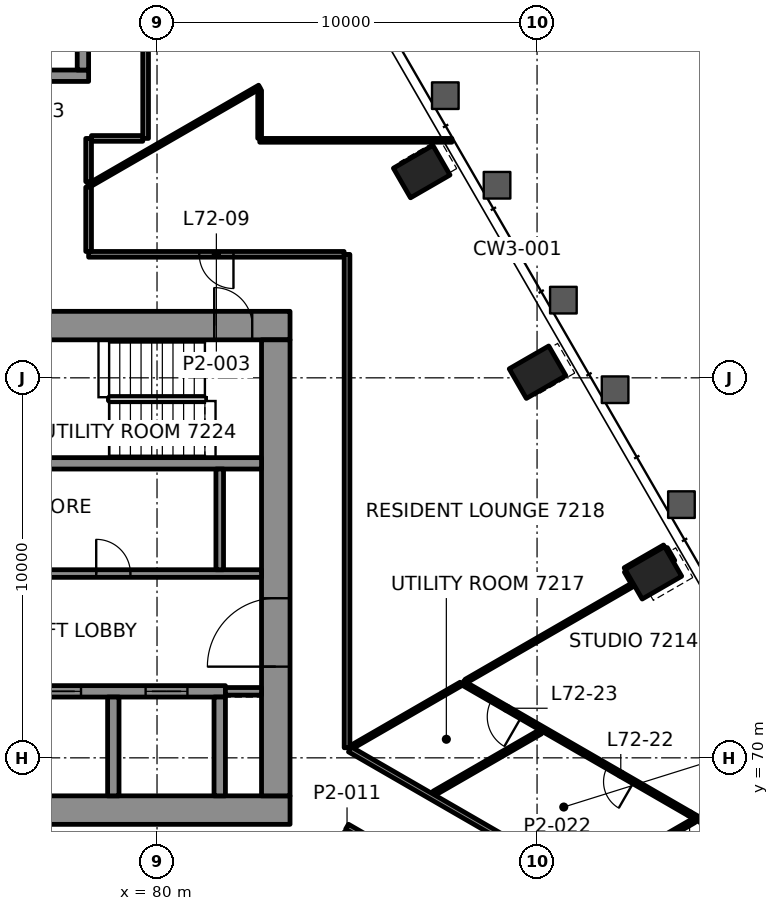
"""IFC4 building model, lengths in metres.
Left out: names, types, materials, properties, quantities, classifications, styles, units other than length and angle.
Written with IfcOpenShell. Run it as: python <this file> out.ifc"""

import sys

from ifc_helpers import new_model, si_unit, direction, frame, frame_2d, origin, origin_2d, place, context, subcontext, project, spatial, rectangle, hollow_rectangle, extrude, element, fill, save


model = new_model("IFC4")
c1 = context("Model", 3, precision=1e-05, world=origin(), true_north=direction((0.0, 1.0)))
c2 = subcontext(c1, "Body", "Model", "MODEL_VIEW")
j1 = project(units=[si_unit("LENGTHUNIT", "METRE"), si_unit("PLANEANGLEUNIT", "RADIAN")], contexts=[c1])
p1 = place(None, origin())
s1 = spatial("IfcSite", under=j1, at=p1, CompositionType="ELEMENT")
p2 = place(p1, origin())
s2 = spatial("IfcBuilding", under=s1, at=p2, CompositionType="ELEMENT")
p3 = place(p2, frame((0.0, 0.0, 298.6)))
s3 = spatial("IfcBuildingStorey", under=s2, at=p3, CompositionType="ELEMENT", Elevation=298.6)
for number, where, z_axis, x_axis in (
    (1, (93.061, 74.869, -0.0), (0.0, 0.0, 1.0), (-0.5, 0.866, 0.0)),
    (2, (90.013, 80.148, -0.0), (0.0, 0.0, 1.0), (-0.5, 0.866, 0.0)),
    (3, (86.965, 85.427, -0.0), (0.0, 0.0, 1.0), (-0.5, 0.866, 0.0)),
):
    element("IfcColumn", number, at=place(p3, frame(where, z_axis=z_axis, x_axis=x_axis)), inside=s3, PredefinedType="COLUMN", context=c2, shape_type="SweptSolid", body=[
        extrude(hollow_rectangle(XDim=0.9, YDim=1.2, WallThickness=0.06, at=origin_2d()), origin(), (0.0, 0.0, 1.0), 3.5),
    ])
p4 = place(p3, frame((66.5, 68.625, 0.0), z_axis=(0.0, 0.0, 1.0), x_axis=(1.0, 0.0, 0.0)))
e4 = element("IfcWall", 4, at=p4, inside=s3, PredefinedType="SHEAR", context=c2, shape_type="SweptSolid", body=[
    extrude(rectangle(XDim=17.0, YDim=0.75, at=frame_2d((8.5, 0.0))), origin(), (0.0, 0.0, 1.0), 3.3),
])
p5 = place(p4, frame((1.9, 0.0, 0.0)))
e5 = element("IfcOpeningElement", 5, at=p5, cuts=e4, PredefinedType="OPENING", context=c2, shape_type="SweptSolid", body=[
    extrude(rectangle(XDim=0.9, YDim=2.1, at=frame_2d((0.45, 1.05))), frame((0.0, 0.385, 0.0), z_axis=(0.0, -1.0, 0.0), x_axis=(1.0, 0.0, 0.0)), (0.0, 0.0, 1.0), 0.77),
])
p6 = place(p3, frame((66.5, 81.375, 0.0), z_axis=(0.0, 0.0, 1.0), x_axis=(1.0, 0.0, 0.0)))
e6 = element("IfcWall", 6, at=p6, inside=s3, PredefinedType="SHEAR", context=c2, shape_type="SweptSolid", body=[
    extrude(rectangle(XDim=17.0, YDim=0.75, at=frame_2d((8.5, 0.0))), origin(), (0.0, 0.0, 1.0), 3.3),
])
p7 = place(p6, frame((1.195, 0.0, 0.0)))
e7 = element("IfcOpeningElement", 7, at=p7, cuts=e6, PredefinedType="OPENING", context=c2, shape_type="SweptSolid", body=[
    extrude(rectangle(XDim=1.0, YDim=2.1, at=frame_2d((0.5, 1.05))), frame((0.0, 0.385, 0.0), z_axis=(0.0, -1.0, 0.0), x_axis=(1.0, 0.0, 0.0)), (0.0, 0.0, 1.0), 0.77),
])
p8 = place(p6, frame((15.005, 0.0, 0.0)))
e8 = element("IfcOpeningElement", 8, at=p8, cuts=e6, PredefinedType="OPENING", context=c2, shape_type="SweptSolid", body=[
    extrude(rectangle(XDim=1.0, YDim=2.1, at=frame_2d((0.5, 1.05))), frame((0.0, 0.385, 0.0), z_axis=(0.0, -1.0, 0.0), x_axis=(1.0, 0.0, 0.0)), (0.0, 0.0, 1.0), 0.77),
])
p9 = place(p6, frame((8.15, 0.0, 0.0)))
e9 = element("IfcOpeningElement", 9, at=p9, cuts=e6, PredefinedType="OPENING", context=c2, shape_type="SweptSolid", body=[
    extrude(rectangle(XDim=0.9, YDim=2.1, at=frame_2d((0.45, 1.05))), frame((0.0, 0.385, 0.0), z_axis=(0.0, -1.0, 0.0), x_axis=(1.0, 0.0, 0.0)), (0.0, 0.0, 1.0), 0.77),
])
p10 = place(p3, frame((83.125, 69.0, 0.0), z_axis=(0.0, 0.0, 1.0), x_axis=(0.0, 1.0, 0.0)))
e10 = element("IfcWall", 10, at=p10, inside=s3, PredefinedType="SHEAR", context=c2, shape_type="SweptSolid", body=[
    extrude(rectangle(XDim=12.0, YDim=0.75, at=frame_2d((6.0, 0.0))), origin(), (0.0, 0.0, 1.0), 3.3),
])
p11 = place(p10, frame((3.4, 0.0, 0.0)))
e11 = element("IfcOpeningElement", 11, at=p11, cuts=e10, PredefinedType="OPENING", context=c2, shape_type="SweptSolid", body=[
    extrude(rectangle(XDim=1.8, YDim=2.1, at=frame_2d((0.9, 1.05))), frame((0.0, 0.385, 0.0), z_axis=(0.0, -1.0, 0.0), x_axis=(1.0, 0.0, 0.0)), (0.0, 0.0, 1.0), 0.77),
])
p12 = place(p3, frame((70.3, 71.75, 0.0), z_axis=(0.0, 0.0, 1.0), x_axis=(1.0, 0.0, 0.0)))
e12 = element("IfcWall", 12, at=p12, inside=s3, PredefinedType="SHEAR", context=c2, shape_type="SweptSolid", body=[
    extrude(rectangle(XDim=11.5, YDim=0.3, at=frame_2d((5.75, 0.0))), origin(), (0.0, 0.0, 1.0), 3.3),
])
p13 = place(p12, frame((1.0, 0.0, 0.0)))
e13 = element("IfcOpeningElement", 13, at=p13, cuts=e12, PredefinedType="OPENING", context=c2, shape_type="SweptSolid", body=[
    extrude(rectangle(XDim=1.1, YDim=2.1, at=frame_2d((0.55, 1.05))), frame((0.0, 0.16, 0.0), z_axis=(0.0, -1.0, 0.0), x_axis=(1.0, 0.0, 0.0)), (0.0, 0.0, 1.0), 0.32),
])
p14 = place(p12, frame((3.8, 0.0, 0.0)))
e14 = element("IfcOpeningElement", 14, at=p14, cuts=e12, PredefinedType="OPENING", context=c2, shape_type="SweptSolid", body=[
    extrude(rectangle(XDim=1.1, YDim=2.1, at=frame_2d((0.55, 1.05))), frame((0.0, 0.16, 0.0), z_axis=(0.0, -1.0, 0.0), x_axis=(1.0, 0.0, 0.0)), (0.0, 0.0, 1.0), 0.32),
])
p15 = place(p12, frame((6.6, 0.0, 0.0)))
e15 = element("IfcOpeningElement", 15, at=p15, cuts=e12, PredefinedType="OPENING", context=c2, shape_type="SweptSolid", body=[
    extrude(rectangle(XDim=1.1, YDim=2.1, at=frame_2d((0.55, 1.05))), frame((0.0, 0.16, 0.0), z_axis=(0.0, -1.0, 0.0), x_axis=(1.0, 0.0, 0.0)), (0.0, 0.0, 1.0), 0.32),
])
p16 = place(p12, frame((9.4, 0.0, 0.0)))
e16 = element("IfcOpeningElement", 16, at=p16, cuts=e12, PredefinedType="OPENING", context=c2, shape_type="SweptSolid", body=[
    extrude(rectangle(XDim=1.1, YDim=2.1, at=frame_2d((0.55, 1.05))), frame((0.0, 0.16, 0.0), z_axis=(0.0, -1.0, 0.0), x_axis=(1.0, 0.0, 0.0)), (0.0, 0.0, 1.0), 0.32),
])
for number, where, z_axis, x_axis in (
    (17, (78.85, 69.0, 0.0), (0.0, 0.0, 1.0), (0.0, 1.0, 0.0)),
    (18, (81.65, 69.0, 0.0), (0.0, 0.0, 1.0), (0.0, 1.0, 0.0)),
):
    element("IfcWall", number, at=place(p3, frame(where, z_axis=z_axis, x_axis=x_axis)), inside=s3, PredefinedType="SHEAR", context=c2, shape_type="SweptSolid", body=[
        extrude(rectangle(XDim=2.6, YDim=0.3, at=frame_2d((1.3, 0.0))), origin(), (0.0, 0.0, 1.0), 3.3),
    ])
p17 = place(p3, frame((67.25, 77.75, 0.0), z_axis=(0.0, 0.0, 1.0), x_axis=(1.0, 0.0, 0.0)))
e19 = element("IfcWall", 19, at=p17, inside=s3, PredefinedType="SHEAR", context=c2, shape_type="SweptSolid", body=[
    extrude(rectangle(XDim=15.5, YDim=0.3, at=frame_2d((7.75, 0.0))), origin(), (0.0, 0.0, 1.0), 3.3),
])
p18 = place(p17, frame((0.445, 0.0, 0.0)))
e20 = element("IfcOpeningElement", 20, at=p18, cuts=e19, PredefinedType="OPENING", context=c2, shape_type="SweptSolid", body=[
    extrude(rectangle(XDim=1.0, YDim=2.1, at=frame_2d((0.5, 1.05))), frame((0.0, 0.16, 0.0), z_axis=(0.0, -1.0, 0.0), x_axis=(1.0, 0.0, 0.0)), (0.0, 0.0, 1.0), 0.32),
])
p19 = place(p3, frame((71.8, 87.95, 0.0), z_axis=(0.0, 0.0, 1.0), x_axis=(1.0, 0.0, 0.0)))
e21 = element("IfcWall", 21, at=p19, inside=s3, PredefinedType="SHEAR", context=c2, shape_type="SweptSolid", body=[
    extrude(rectangle(XDim=6.4, YDim=0.3, at=frame_2d((3.2, 0.0))), origin(), (0.0, 0.0, 1.0), 3.3),
])
p20 = place(p19, frame((1.325, 0.0, 0.0)))
e22 = element("IfcOpeningElement", 22, at=p20, cuts=e21, PredefinedType="OPENING", context=c2, shape_type="SweptSolid", body=[
    extrude(rectangle(XDim=1.0, YDim=2.1, at=frame_2d((0.5, 1.05))), frame((0.0, 0.16, 0.0), z_axis=(0.0, -1.0, 0.0), x_axis=(1.0, 0.0, 0.0)), (0.0, 0.0, 1.0), 0.32),
])
p21 = place(p19, frame((4.125, 0.0, 0.0)))
e23 = element("IfcOpeningElement", 23, at=p21, cuts=e21, PredefinedType="OPENING", context=c2, shape_type="SweptSolid", body=[
    extrude(rectangle(XDim=1.2, YDim=2.1, at=frame_2d((0.6, 1.05))), frame((0.0, 0.16, 0.0), z_axis=(0.0, -1.0, 0.0), x_axis=(1.0, 0.0, 0.0)), (0.0, 0.0, 1.0), 0.32),
])
p22 = place(p3, frame((78.05, 88.1, 0.0), z_axis=(0.0, 0.0, 1.0), x_axis=(0.0, 1.0, 0.0)))
e24 = element("IfcWall", 24, at=p22, inside=s3, PredefinedType="SHEAR", context=c2, shape_type="SweptSolid", body=[
    extrude(rectangle(XDim=6.2, YDim=0.3, at=frame_2d((3.1, 0.0))), origin(), (0.0, 0.0, 1.0), 3.3),
])
p23 = place(p3, frame((84.923, 83.25, 0.0), z_axis=(0.0, 0.0, 1.0), x_axis=(-1.0, 0.0, 0.0)))
e25 = element("IfcWall", 25, at=p23, inside=s3, PredefinedType="PARTITIONING", context=c2, shape_type="SweptSolid", body=[
    extrude(rectangle(XDim=6.723, YDim=0.15, at=frame_2d((3.362, 0.0))), origin(), (0.0, 0.0, 1.0), 2.7),
])
p24 = place(p23, frame((2.911, 0.0, 0.0)))
e26 = element("IfcOpeningElement", 26, at=p24, cuts=e25, PredefinedType="OPENING", context=c2, shape_type="SweptSolid", body=[
    extrude(rectangle(XDim=0.9, YDim=2.1, at=frame_2d((0.45, 1.05))), frame((0.0, 0.085, 0.0), z_axis=(0.0, -1.0, 0.0), x_axis=(1.0, 0.0, 0.0)), (0.0, 0.0, 1.0), 0.17),
])
p25 = place(p3, frame((82.702, 86.25, 0.0), z_axis=(0.0, 0.0, 1.0), x_axis=(1.0, 0.0, 0.0)))
e27 = element("IfcWall", 27, at=p25, inside=s3, PredefinedType="PARTITIONING", context=c2, shape_type="SweptSolid", body=[
    extrude(rectangle(XDim=5.058, YDim=0.1, at=frame_2d((2.529, 0.0))), origin(), (0.0, 0.0, 1.0), 2.688),
])
p26 = place(p3, frame((78.275, 86.3, 0.0), z_axis=(0.0, 0.0, 1.0), x_axis=(1.0, 0.0, 0.0)))
e28 = element("IfcWall", 28, at=p26, inside=s3, PredefinedType="PARTITIONING", context=c2, shape_type="SweptSolid", body=[
    extrude(rectangle(XDim=1.35, YDim=0.15, at=frame_2d((0.675, 0.0))), origin(), (0.0, 0.0, 1.0), 2.7),
])
for number, where, z_axis, x_axis in (
    (29, (91.333, 66.736, 0.0), (0.0, 0.0, 1.0), (0.866, 0.5, 0.0)),
    (30, (87.292, 69.069, 0.0), (0.0, 0.0, 1.0), (0.866, 0.5, 0.0)),
):
    element("IfcWall", number, at=place(p3, frame(where, z_axis=z_axis, x_axis=x_axis)), inside=s3, PredefinedType="PARTITIONING", context=c2, shape_type="SweptSolid", body=[
        extrude(rectangle(XDim=3.228, YDim=0.12, at=frame_2d((1.614, 0.0))), origin(), (0.0, 0.0, 1.0), 2.7),
    ])
p27 = place(p3, frame((85.145, 70.299, 0.0), z_axis=(0.0, 0.0, 1.0), x_axis=(0.866032610133, 0.499987518031, 0.0)))
e31 = element("IfcWall", 31, at=p27, inside=s3, PredefinedType="PARTITIONING", context=c2, shape_type="SweptSolid", body=[
    extrude(rectangle(XDim=3.295, YDim=0.1, at=frame_2d((1.648, 0.0))), origin(), (0.0, 0.0, 1.0), 2.7),
])
p28 = place(p3, frame((92.318, 74.959, 0.0), z_axis=(0.0, 0.0, 1.0), x_axis=(0.866087020037, 0.499893262331, 0.0)))
e32 = element("IfcWall", 32, at=p28, inside=s3, PredefinedType="PARTITIONING", context=c2, shape_type="SweptSolid", body=[
    extrude(rectangle(XDim=1.196, YDim=0.1, at=frame_2d((0.598, 0.0))), origin(), (0.0, 0.0, 1.0), 2.688),
])
p29 = place(p3, frame((78.2, 85.06, 0.0), z_axis=(0.0, 0.0, 1.0), x_axis=(0.866025161861, 0.500000419024, 0.0)))
e33 = element("IfcWall", 33, at=p29, inside=s3, PredefinedType="PARTITIONING", context=c2, shape_type="SweptSolid", body=[
    extrude(rectangle(XDim=5.195, YDim=0.1, at=frame_2d((2.598, 0.0))), origin(), (0.0, 0.0, 1.0), 2.7),
])
p30 = place(p3, frame((85.0, 70.266, 0.0), z_axis=(0.0, 0.0, 1.0), x_axis=(0.0, 1.0, 0.0)))
e34 = element("IfcWall", 34, at=p30, inside=s3, PredefinedType="PARTITIONING", context=c2, shape_type="SweptSolid", body=[
    extrude(rectangle(XDim=12.982, YDim=0.15, at=frame_2d((6.491, 0.0))), origin(), (0.0, 0.0, 1.0), 2.7),
])
p31 = place(p3, frame((82.7, 86.302, 0.0), z_axis=(0.0, 0.0, 1.0), x_axis=(0.0, 1.0, 0.0)))
e35 = element("IfcWall", 35, at=p31, inside=s3, PredefinedType="PARTITIONING", context=c2, shape_type="SweptSolid", body=[
    extrude(rectangle(XDim=1.267, YDim=0.1, at=frame_2d((0.634, 0.0))), origin(), (0.0, 0.0, 1.0), 2.7),
])
p32 = place(p3, frame((79.7, 86.301, 0.0), z_axis=(0.0, 0.0, 1.0), x_axis=(0.0, 1.0, 0.0)))
e36 = element("IfcWall", 36, at=p32, inside=s3, PredefinedType="PARTITIONING", context=c2, shape_type="SweptSolid", body=[
    extrude(rectangle(XDim=9.799, YDim=0.15, at=frame_2d((4.899, 0.0))), origin(), (0.0, 0.0, 1.0), 2.7),
])
p33 = place(p3, frame((78.2, 83.325, 0.0), z_axis=(0.0, 0.0, 1.0), x_axis=(0.0, 1.0, 0.0)))
e37 = element("IfcWall", 37, at=p33, inside=s3, PredefinedType="PARTITIONING", context=c2, shape_type="SweptSolid", body=[
    extrude(rectangle(XDim=1.692, YDim=0.15, at=frame_2d((0.846, 0.0))), origin(), (0.0, 0.0, 1.0), 2.7),
])
p34 = place(p3, frame((93.58, 75.169, 0.0), z_axis=(0.0, 0.0, 1.0), x_axis=(-0.500153222552, 0.865936922628, 0.0)))
e38 = element("IfcWall", 38, at=p34, inside=s3, PredefinedType="PARTITIONING", context=c2, shape_type="SweptSolid", body=[
    extrude(rectangle(XDim=0.393, YDim=0.1, at=frame_2d((0.196, 0.0))), origin(), (0.0, 0.0, 1.0), 2.7),
])
p35 = place(p3, frame((92.511, 74.621, 0.0), z_axis=(0.0, 0.0, 1.0), x_axis=(-0.499868360126, 0.866101392762, 0.0)))
e39 = element("IfcWall", 39, at=p35, inside=s3, PredefinedType="PARTITIONING", context=c2, shape_type="SweptSolid", body=[
    extrude(rectangle(XDim=0.338, YDim=0.1, at=frame_2d((0.169, 0.0))), origin(), (0.0, 0.0, 1.0), 2.7),
])
p36 = place(p3, frame((99.982, 65.08, 0.0), z_axis=(0.0, 0.0, 1.0), x_axis=(-0.86602868724, 0.499994312846, 0.0)))
e40 = element("IfcWall", 40, at=p36, inside=s3, PredefinedType="PARTITIONING", context=c2, shape_type="SweptSolid", body=[
    extrude(rectangle(XDim=13.785, YDim=0.12, at=frame_2d((6.893, 0.0))), origin(), (0.0, 0.0, 1.0), 2.7),
])
p37 = place(p36, frame((3.477, 0.0, 0.0)))
e41 = element("IfcOpeningElement", 41, at=p37, cuts=e40, PredefinedType="OPENING", context=c2, shape_type="SweptSolid", body=[
    extrude(rectangle(XDim=0.9, YDim=2.1, at=frame_2d((0.45, 1.05))), frame((0.0, 0.07, 0.0), z_axis=(0.0, -1.0, 0.0), x_axis=(1.0, 0.0, 0.0)), (0.0, 0.0, 1.0), 0.14),
])
p38 = place(p36, frame((8.583, 0.0, 0.0)))
e42 = element("IfcOpeningElement", 42, at=p38, cuts=e40, PredefinedType="OPENING", context=c2, shape_type="SweptSolid", body=[
    extrude(rectangle(XDim=0.8, YDim=2.1, at=frame_2d((0.4, 1.05))), frame((0.0, 0.07, 0.0), z_axis=(0.0, -1.0, 0.0), x_axis=(1.0, 0.0, 0.0)), (0.0, 0.0, 1.0), 0.14),
])
p39 = place(p36, frame((12.001, 0.0, 0.0)))
e43 = element("IfcOpeningElement", 43, at=p39, cuts=e40, PredefinedType="OPENING", context=c2, shape_type="SweptSolid", body=[
    extrude(rectangle(XDim=0.9, YDim=2.1, at=frame_2d((0.45, 1.05))), frame((0.0, 0.07, 0.0), z_axis=(0.0, -1.0, 0.0), x_axis=(1.0, 0.0, 0.0)), (0.0, 0.0, 1.0), 0.14),
])
p40 = place(p3, frame((85.075, 70.222, 0.0), z_axis=(0.0, 0.0, 1.0), x_axis=(0.866023935413, -0.500002543286, 0.0)))
e44 = element("IfcWall", 44, at=p40, inside=s3, PredefinedType="PARTITIONING", context=c2, shape_type="SweptSolid", body=[
    extrude(rectangle(XDim=12.601, YDim=0.15, at=frame_2d((6.3, 0.0))), origin(), (0.0, 0.0, 1.0), 2.7),
])
p41 = place(p40, frame((9.249, 0.0, 0.0)))
e45 = element("IfcOpeningElement", 45, at=p41, cuts=e44, PredefinedType="OPENING", context=c2, shape_type="SweptSolid", body=[
    extrude(rectangle(XDim=1.0, YDim=2.1, at=frame_2d((0.5, 1.05))), frame((0.0, 0.085, 0.0), z_axis=(0.0, -1.0, 0.0), x_axis=(1.0, 0.0, 0.0)), (0.0, 0.0, 1.0), 0.17),
])
p42 = place(p3, frame((95.088, 62.363, 0.0), z_axis=(0.0, 0.0, 1.0), x_axis=(-0.866026430432, 0.49999822179, 0.0)))
e46 = element("IfcWall", 46, at=p42, inside=s3, PredefinedType="PARTITIONING", context=c2, shape_type="SweptSolid", body=[
    extrude(rectangle(XDim=11.648, YDim=0.15, at=frame_2d((5.824, 0.0))), origin(), (0.0, 0.0, 1.0), 2.547),
])
p43 = place(p3, frame((88.129, 72.021, 0.0), z_axis=(0.0, 0.0, 1.0), x_axis=(0.866010809447, 0.500025277282, 0.0)))
e47 = element("IfcWall", 47, at=p43, inside=s3, PredefinedType="PARTITIONING", context=c2, shape_type="SweptSolid", body=[
    extrude(rectangle(XDim=5.094, YDim=0.1, at=frame_2d((2.547, 0.0))), origin(), (0.0, 0.0, 1.0), 2.7),
])
p44 = place(p3, frame((78.2, 85.161, 0.0), z_axis=(0.0, 0.0, 1.0), x_axis=(0.0, 1.0, 0.0)))
e48 = element("IfcWall", 48, at=p44, inside=s3, PredefinedType="PARTITIONING", context=c2, shape_type="SweptSolid", body=[
    extrude(rectangle(XDim=1.139, YDim=0.15, at=frame_2d((0.57, 0.0))), origin(), (0.0, 0.0, 1.0), 2.7),
])
p45 = place(p3, frame((81.8, 71.75, 0.0), z_axis=(0.0, 0.0, 1.0), x_axis=(1.0, 0.0, 0.0)))
e49 = element("IfcWall", 49, at=p45, inside=s3, PredefinedType="PARTITIONING", context=c2, shape_type="SweptSolid", body=[
    extrude(rectangle(XDim=0.95, YDim=0.2, at=frame_2d((0.475, 0.0))), origin(), (0.0, 0.0, 1.0), 3.3),
])
p46 = place(p3, frame((76.2, 74.85, 0.0), z_axis=(0.0, 0.0, 1.0), x_axis=(1.0, 0.0, 0.0)))
e50 = element("IfcWall", 50, at=p46, inside=s3, PredefinedType="PARTITIONING", context=c2, shape_type="SweptSolid", body=[
    extrude(rectangle(XDim=6.55, YDim=0.2, at=frame_2d((3.275, 0.0))), origin(), (0.0, 0.0, 1.0), 3.3),
])
p47 = place(p46, frame((2.2, 0.0, 0.0)))
e51 = element("IfcOpeningElement", 51, at=p47, cuts=e50, PredefinedType="OPENING", context=c2, shape_type="SweptSolid", body=[
    extrude(rectangle(XDim=0.9, YDim=2.1, at=frame_2d((0.45, 1.05))), frame((0.0, 0.11, 0.0), z_axis=(0.0, -1.0, 0.0), x_axis=(1.0, 0.0, 0.0)), (0.0, 0.0, 1.0), 0.22),
])
p48 = place(p3, frame((81.65, 74.95, 0.0), z_axis=(0.0, 0.0, 1.0), x_axis=(0.0, 1.0, 0.0)))
e52 = element("IfcWall", 52, at=p48, inside=s3, PredefinedType="PARTITIONING", context=c2, shape_type="SweptSolid", body=[
    extrude(rectangle(XDim=2.65, YDim=0.2, at=frame_2d((1.325, 0.0))), origin(), (0.0, 0.0, 1.0), 3.3),
])
p49 = place(p24, origin())
e53 = element("IfcDoor", 53, at=p49, inside=s3, OperationType="SINGLE_SWING_RIGHT", PredefinedType="DOOR", context=c2, shape_type="SweptSolid", body=[
    extrude(rectangle(XDim=0.9, YDim=2.1, at=frame_2d((0.45, 1.05))), frame((0.0, 0.025, 0.0), z_axis=(0.0, -1.0, 0.0), x_axis=(1.0, 0.0, 0.0)), (0.0, 0.0, 1.0), 0.05),
])
fill(e26, e53)
p50 = place(p38, origin())
e54 = element("IfcDoor", 54, at=p50, inside=s3, OperationType="SINGLE_SWING_RIGHT", PredefinedType="DOOR", context=c2, shape_type="SweptSolid", body=[
    extrude(rectangle(XDim=0.8, YDim=2.1, at=frame_2d((0.4, 1.05))), frame((0.0, 0.025, 0.0), z_axis=(0.0, -1.0, 0.0), x_axis=(1.0, 0.0, 0.0)), (0.0, 0.0, 1.0), 0.05),
])
fill(e42, e54)
p51 = place(p39, origin())
e55 = element("IfcDoor", 55, at=p51, inside=s3, OperationType="SINGLE_SWING_LEFT", PredefinedType="DOOR", context=c2, shape_type="SweptSolid", body=[
    extrude(rectangle(XDim=0.9, YDim=2.1, at=frame_2d((0.45, 1.05))), frame((0.0, 0.025, 0.0), z_axis=(0.0, -1.0, 0.0), x_axis=(1.0, 0.0, 0.0)), (0.0, 0.0, 1.0), 0.05),
])
fill(e43, e55)
p52 = place(p15, origin())
e56 = element("IfcDoor", 56, at=p52, inside=s3, OperationType="DOUBLE_DOOR_SLIDING", PredefinedType="DOOR", context=c2, shape_type="SweptSolid", body=[
    extrude(rectangle(XDim=1.1, YDim=2.1, at=frame_2d((0.55, 1.05))), frame((0.0, 0.025, 0.0), z_axis=(0.0, -1.0, 0.0), x_axis=(1.0, 0.0, 0.0)), (0.0, 0.0, 1.0), 0.05),
])
fill(e15, e56)
p53 = place(p16, origin())
e57 = element("IfcDoor", 57, at=p53, inside=s3, OperationType="DOUBLE_DOOR_SLIDING", PredefinedType="DOOR", context=c2, shape_type="SweptSolid", body=[
    extrude(rectangle(XDim=1.1, YDim=2.1, at=frame_2d((0.55, 1.05))), frame((0.0, 0.025, 0.0), z_axis=(0.0, -1.0, 0.0), x_axis=(1.0, 0.0, 0.0)), (0.0, 0.0, 1.0), 0.05),
])
fill(e16, e57)
p54 = place(p8, origin())
e58 = element("IfcDoor", 58, at=p54, inside=s3, OperationType="SINGLE_SWING_LEFT", PredefinedType="DOOR", context=c2, shape_type="SweptSolid", body=[
    extrude(rectangle(XDim=1.0, YDim=2.1, at=frame_2d((0.5, 1.05))), frame((0.0, 0.095, 0.0), z_axis=(0.0, -1.0, 0.0), x_axis=(1.0, 0.0, 0.0)), (0.0, 0.0, 1.0), 0.19),
])
fill(e8, e58)
p55 = place(p11, origin())
e59 = element("IfcDoor", 59, at=p55, inside=s3, OperationType="SINGLE_SWING_LEFT", PredefinedType="DOOR", context=c2, shape_type="SweptSolid", body=[
    extrude(rectangle(XDim=1.8, YDim=2.1, at=frame_2d((0.9, 1.05))), frame((0.0, 0.095, 0.0), z_axis=(0.0, -1.0, 0.0), x_axis=(1.0, 0.0, 0.0)), (0.0, 0.0, 1.0), 0.19),
])
fill(e11, e59)
p56 = place(p47, origin())
e60 = element("IfcDoor", 60, at=p56, inside=s3, OperationType="SINGLE_SWING_LEFT", PredefinedType="DOOR", context=c2, shape_type="SweptSolid", body=[
    extrude(rectangle(XDim=0.9, YDim=2.1, at=frame_2d((0.45, 1.05))), frame((0.0, 0.025, 0.0), z_axis=(0.0, -1.0, 0.0), x_axis=(1.0, 0.0, 0.0)), (0.0, 0.0, 1.0), 0.05),
])
fill(e51, e60)
save(model, sys.argv[1])
